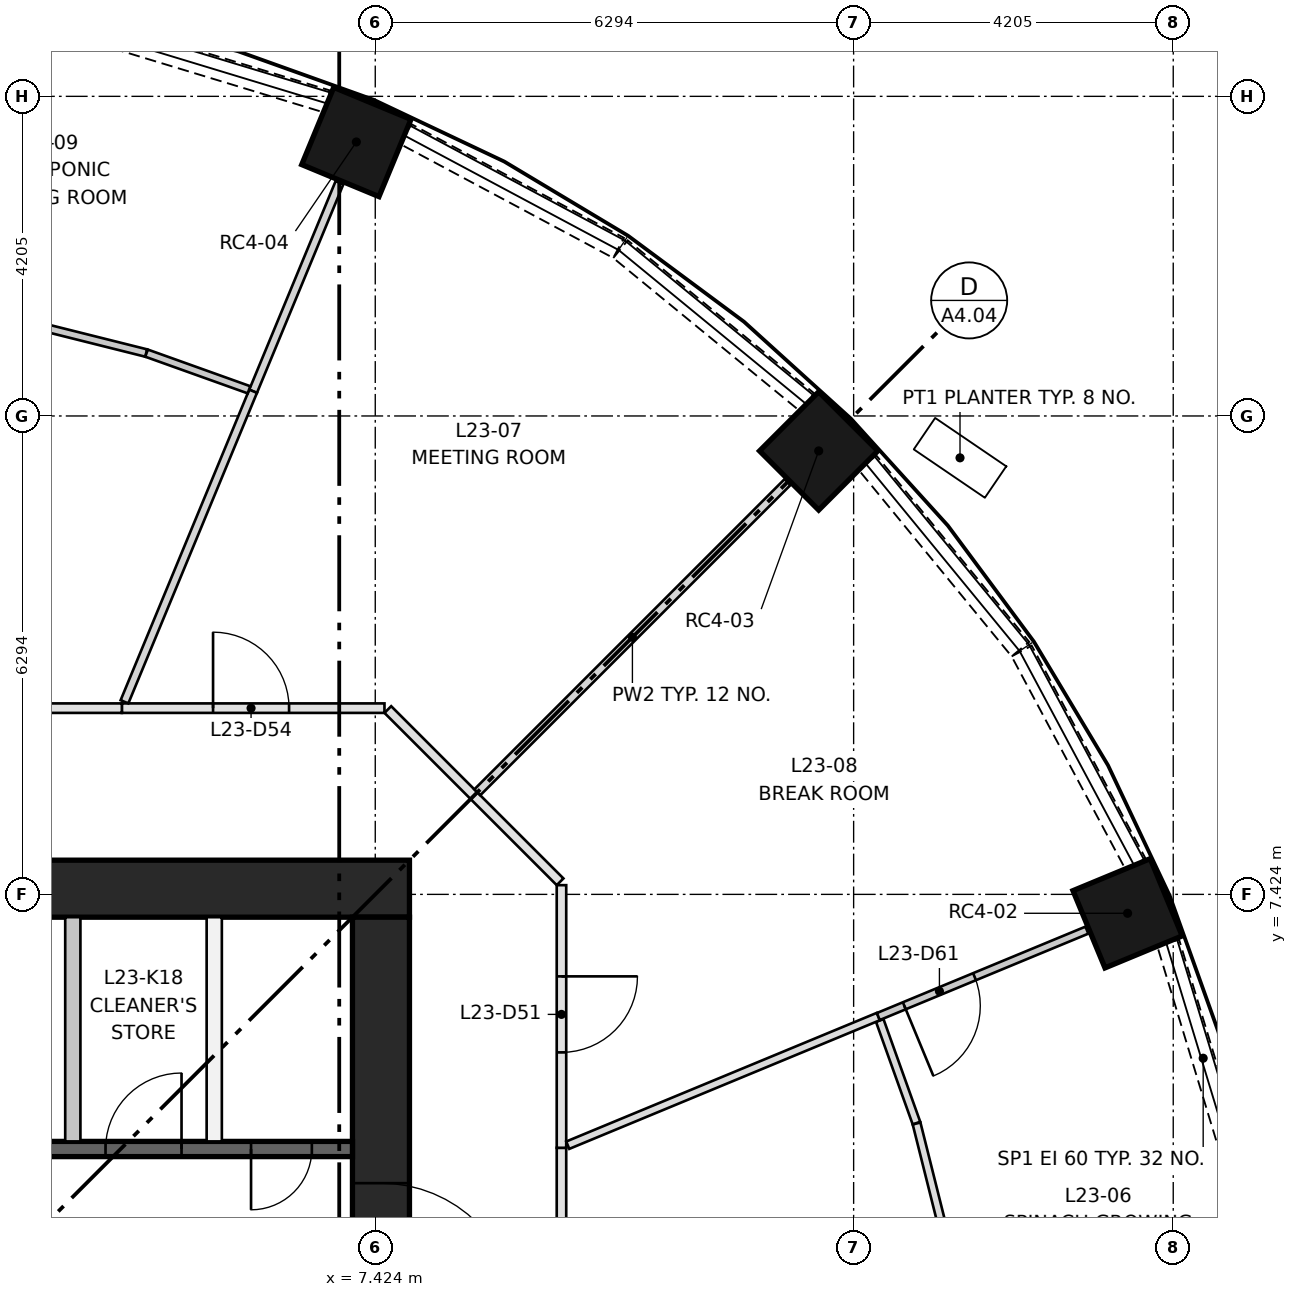
"""IFC4 building model, lengths in metres.
Left out: names, types, materials, properties, quantities, classifications, styles, units other than length and angle.
Written with IfcOpenShell. Run it as: python <this file> out.ifc"""

import sys

from ifc_helpers import new_model, si_unit, direction, frame, frame_2d, origin, origin_2d, place, context, subcontext, project, spatial, rectangle, extrude, element, fill, save


model = new_model("IFC4")
c1 = context("Model", 3, precision=1e-05, world=origin(), true_north=direction((0.0, 1.0)))
c2 = subcontext(c1, "Body", "Model", "MODEL_VIEW")
j1 = project(units=[si_unit("LENGTHUNIT", "METRE"), si_unit("PLANEANGLEUNIT", "RADIAN")], contexts=[c1])
p1 = place(None, origin())
s1 = spatial("IfcSite", under=j1, at=p1, CompositionType="ELEMENT")
p2 = place(p1, origin())
s2 = spatial("IfcBuilding", under=s1, at=p2, CompositionType="ELEMENT")
p3 = place(p2, frame((0.0, 0.0, 91.0)))
s3 = spatial("IfcBuildingStorey", under=s2, at=p3, CompositionType="ELEMENT", Elevation=91.0)
for number, where, z_axis, x_axis in (
    (1, (17.323, 7.175, 0.0), (0.0, 0.0, 1.0), (0.924, 0.383, 0.0)),
    (2, (13.258, 13.258, 0.0), (0.0, 0.0, 1.0), (0.707, 0.707, 0.0)),
    (3, (7.175, 17.323, 0.0), (0.0, 0.0, 1.0), (0.383, 0.924, 0.0)),
):
    element("IfcColumn", number, at=place(p3, frame(where, z_axis=z_axis, x_axis=x_axis)), inside=s3, PredefinedType="COLUMN", context=c2, shape_type="SweptSolid", body=[
        extrude(rectangle(XDim=1.1, YDim=1.1, at=origin_2d()), origin(), (0.0, 0.0, 1.0), 3.65),
    ])
p4 = place(p3, frame((-7.874, 7.499, 0.0), z_axis=(0.0, 0.0, 1.0), x_axis=(1.0, 0.0, 0.0)))
e4 = element("IfcWall", 4, at=p4, inside=s3, PredefinedType="SHEAR", context=c2, shape_type="SweptSolid", body=[
    extrude(rectangle(XDim=15.748, YDim=0.75, at=frame_2d((7.874, 0.0))), origin(), (0.0, 0.0, 1.0), 3.65),
])
p5 = place(p3, frame((7.499, -7.124, 0.0), z_axis=(0.0, 0.0, 1.0), x_axis=(0.0, 1.0, 0.0)))
e5 = element("IfcWall", 5, at=p5, inside=s3, PredefinedType="SHEAR", context=c2, shape_type="SweptSolid", body=[
    extrude(rectangle(XDim=14.248, YDim=0.75, at=frame_2d((7.124, 0.0))), origin(), (0.0, 0.0, 1.0), 3.65),
])
p6 = place(p5, frame((6.624, 0.0, 0.0)))
e6 = element("IfcOpeningElement", 6, at=p6, cuts=e5, PredefinedType="OPENING", context=c2, shape_type="SweptSolid", body=[
    extrude(rectangle(XDim=1.0, YDim=2.1, at=frame_2d((0.5, 1.05))), frame((0.0, 0.385, 0.0), z_axis=(0.0, -1.0, 0.0), x_axis=(1.0, 0.0, 0.0)), (0.0, 0.0, 1.0), 0.77),
])
p7 = place(p5, frame((3.5, 0.0, 0.0)))
e7 = element("IfcOpeningElement", 7, at=p7, cuts=e5, PredefinedType="OPENING", context=c2, shape_type="SweptSolid", body=[
    extrude(rectangle(XDim=1.8, YDim=2.1, at=frame_2d((0.9, 1.05))), frame((0.0, 0.385, 0.0), z_axis=(0.0, -1.0, 0.0), x_axis=(1.0, 0.0, 0.0)), (0.0, 0.0, 1.0), 0.77),
])
p8 = place(p5, frame((8.948, 0.0, 0.0)))
e8 = element("IfcOpeningElement", 8, at=p8, cuts=e5, PredefinedType="OPENING", context=c2, shape_type="SweptSolid", body=[
    extrude(rectangle(XDim=1.8, YDim=2.1, at=frame_2d((0.9, 1.05))), frame((0.0, 0.385, 0.0), z_axis=(0.0, -1.0, 0.0), x_axis=(1.0, 0.0, 0.0)), (0.0, 0.0, 1.0), 0.77),
])
p9 = place(p3, frame((0.0, 4.074, 0.0), z_axis=(0.0, 0.0, 1.0), x_axis=(1.0, 0.0, 0.0)))
e9 = element("IfcWall", 9, at=p9, inside=s3, PredefinedType="SHEAR", context=c2, shape_type="SweptSolid", body=[
    extrude(rectangle(XDim=7.124, YDim=0.2, at=frame_2d((3.562, 0.0))), origin(), (0.0, 0.0, 1.0), 3.3),
])
p10 = place(p9, frame((0.43, 0.0, 0.0)))
e10 = element("IfcOpeningElement", 10, at=p10, cuts=e9, PredefinedType="OPENING", context=c2, shape_type="SweptSolid", body=[
    extrude(rectangle(XDim=1.0, YDim=2.1, at=frame_2d((0.5, 1.05))), frame((0.0, 0.11, 0.0), z_axis=(0.0, -1.0, 0.0), x_axis=(1.0, 0.0, 0.0)), (0.0, 0.0, 1.0), 0.22),
])
p11 = place(p9, frame((2.153, 0.0, 0.0)))
e11 = element("IfcOpeningElement", 11, at=p11, cuts=e9, PredefinedType="OPENING", context=c2, shape_type="SweptSolid", body=[
    extrude(rectangle(XDim=1.0, YDim=2.1, at=frame_2d((0.5, 1.05))), frame((0.0, 0.11, 0.0), z_axis=(0.0, -1.0, 0.0), x_axis=(1.0, 0.0, 0.0)), (0.0, 0.0, 1.0), 0.22),
])
p12 = place(p9, frame((3.875, 0.0, 0.0)))
e12 = element("IfcOpeningElement", 12, at=p12, cuts=e9, PredefinedType="OPENING", context=c2, shape_type="SweptSolid", body=[
    extrude(rectangle(XDim=1.0, YDim=2.1, at=frame_2d((0.5, 1.05))), frame((0.0, 0.11, 0.0), z_axis=(0.0, -1.0, 0.0), x_axis=(1.0, 0.0, 0.0)), (0.0, 0.0, 1.0), 0.22),
])
p13 = place(p9, frame((5.79, 0.0, 0.0)))
e13 = element("IfcOpeningElement", 13, at=p13, cuts=e9, PredefinedType="OPENING", context=c2, shape_type="SweptSolid", body=[
    extrude(rectangle(XDim=0.8, YDim=2.1, at=frame_2d((0.4, 1.05))), frame((0.0, 0.11, 0.0), z_axis=(0.0, -1.0, 0.0), x_axis=(1.0, 0.0, 0.0)), (0.0, 0.0, 1.0), 0.22),
])
for number, where, z_axis, x_axis in (
    (14, (3.445, 4.174, 0.0), (0.0, 0.0, 1.0), (0.0, 1.0, 0.0)),
    (15, (5.305, 4.174, 0.0), (0.0, 0.0, 1.0), (0.0, 1.0, 0.0)),
):
    element("IfcWall", number, at=place(p3, frame(where, z_axis=z_axis, x_axis=x_axis)), inside=s3, PredefinedType="PARTITIONING", context=c2, shape_type="SweptSolid", body=[
        extrude(rectangle(XDim=2.95, YDim=0.2, at=frame_2d((1.475, 0.0))), origin(), (0.0, 0.0, 1.0), 3.3),
    ])
p14 = place(p3, frame((18.778, 3.75, 0.0), z_axis=(0.0, 0.0, 1.0), x_axis=(-0.290325591482, 0.956927923582, 0.0)))
e16 = element("IfcWall", 16, at=p14, inside=s3, PredefinedType="SOLIDWALL", context=c2, shape_type="SweptSolid", body=[
    extrude(rectangle(XDim=3.173, YDim=0.3, at=frame_2d((1.586, 0.0))), origin(), (0.0, 0.0, 1.0), 0.9),
])
p15 = place(p3, frame((17.425, 7.828, 0.0), z_axis=(0.0, 0.0, 1.0), x_axis=(-0.471458802606, 0.88188808669, 0.0)))
e17 = element("IfcWall", 17, at=p15, inside=s3, PredefinedType="SOLIDWALL", context=c2, shape_type="SweptSolid", body=[
    extrude(rectangle(XDim=3.172, YDim=0.3, at=frame_2d((1.586, 0.0))), origin(), (0.0, 0.0, 1.0), 0.9),
])
for number, where, z_axis, x_axis in (
    (18, (15.913, 10.651, 0.0), (0.0, 0.0, 1.0), (-0.634, 0.773, 0.0)),
    (19, (13.104, 13.9, 0.0), (0.0, 0.0, 1.0), (-0.773, 0.634, 0.0)),
):
    element("IfcWall", number, at=place(p3, frame(where, z_axis=z_axis, x_axis=x_axis)), inside=s3, PredefinedType="SOLIDWALL", context=c2, shape_type="SweptSolid", body=[
        extrude(rectangle(XDim=3.173, YDim=0.3, at=frame_2d((1.586, 0.0))), origin(), (0.0, 0.0, 1.0), 0.9),
    ])
p16 = place(p3, frame((10.626, 15.929, 0.0), z_axis=(0.0, 0.0, 1.0), x_axis=(-0.88188808669, 0.471458802606, 0.0)))
e20 = element("IfcWall", 20, at=p16, inside=s3, PredefinedType="SOLIDWALL", context=c2, shape_type="SweptSolid", body=[
    extrude(rectangle(XDim=3.172, YDim=0.3, at=frame_2d((1.586, 0.0))), origin(), (0.0, 0.0, 1.0), 0.9),
])
p17 = place(p3, frame((6.787, 17.856, 0.0), z_axis=(0.0, 0.0, 1.0), x_axis=(-0.956927923582, 0.290325591482, 0.0)))
e21 = element("IfcWall", 21, at=p17, inside=s3, PredefinedType="SOLIDWALL", context=c2, shape_type="SweptSolid", body=[
    extrude(rectangle(XDim=3.173, YDim=0.3, at=frame_2d((1.586, 0.0))), origin(), (0.0, 0.0, 1.0), 0.9),
])
p18 = place(p3, frame((9.874, 4.09, 0.0), z_axis=(0.0, 0.0, 1.0), x_axis=(0.0, -1.0, 0.0)))
e22 = element("IfcWall", 22, at=p18, inside=s3, PredefinedType="PARTITIONING", context=c2, shape_type="SweptSolid", body=[
    extrude(rectangle(XDim=4.09, YDim=0.125, at=frame_2d((2.045, 0.0))), origin(), (0.0, 0.0, 1.0), 3.3),
])
p19 = place(p18, frame((1.5, 0.0, 0.0)))
e23 = element("IfcOpeningElement", 23, at=p19, cuts=e22, PredefinedType="OPENING", context=c2, shape_type="SweptSolid", body=[
    extrude(rectangle(XDim=1.0, YDim=2.1, at=frame_2d((0.5, 1.05))), frame((0.0, 0.073, 0.0), z_axis=(0.0, -1.0, 0.0), x_axis=(1.0, 0.0, 0.0)), (0.0, 0.0, 1.0), 0.145),
])
p20 = place(p3, frame((8.722, 8.722, 0.0), z_axis=(0.0, 0.0, 1.0), x_axis=(0.70718294931, -0.707030604857, 0.0)))
e24 = element("IfcWall", 24, at=p20, inside=s3, PredefinedType="PARTITIONING", context=c2, shape_type="SweptSolid", body=[
    extrude(rectangle(XDim=1.603, YDim=0.125, at=frame_2d((0.801, 0.0))), origin(), (0.0, 0.0, 1.0), 3.3),
])
p21 = place(p3, frame((9.874, 7.545, 0.0), z_axis=(0.0, 0.0, 1.0), x_axis=(0.0, -1.0, 0.0)))
e25 = element("IfcWall", 25, at=p21, inside=s3, PredefinedType="PARTITIONING", context=c2, shape_type="SweptSolid", body=[
    extrude(rectangle(XDim=3.455, YDim=0.125, at=frame_2d((1.728, 0.0))), origin(), (0.0, 0.0, 1.0), 3.3),
])
p22 = place(p21, frame((1.2, 0.0, 0.0)))
e26 = element("IfcOpeningElement", 26, at=p22, cuts=e25, PredefinedType="OPENING", context=c2, shape_type="SweptSolid", body=[
    extrude(rectangle(XDim=1.0, YDim=2.1, at=frame_2d((0.5, 1.05))), frame((0.0, 0.073, 0.0), z_axis=(0.0, -1.0, 0.0), x_axis=(1.0, 0.0, 0.0)), (0.0, 0.0, 1.0), 0.145),
])
p23 = place(p3, frame((4.09, 9.874, 0.0), z_axis=(0.0, 0.0, 1.0), x_axis=(1.0, 0.0, 0.0)))
e27 = element("IfcWall", 27, at=p23, inside=s3, PredefinedType="PARTITIONING", context=c2, shape_type="SweptSolid", body=[
    extrude(rectangle(XDim=3.455, YDim=0.125, at=frame_2d((1.728, 0.0))), origin(), (0.0, 0.0, 1.0), 3.3),
])
p24 = place(p23, frame((1.2, 0.0, 0.0)))
e28 = element("IfcOpeningElement", 28, at=p24, cuts=e27, PredefinedType="OPENING", context=c2, shape_type="SweptSolid", body=[
    extrude(rectangle(XDim=1.0, YDim=2.1, at=frame_2d((0.5, 1.05))), frame((0.0, 0.073, 0.0), z_axis=(0.0, -1.0, 0.0), x_axis=(1.0, 0.0, 0.0)), (0.0, 0.0, 1.0), 0.145),
])
p25 = place(p3, frame((7.589, 9.856, 0.0), z_axis=(0.0, 0.0, 1.0), x_axis=(0.707030604857, -0.70718294931, 0.0)))
e29 = element("IfcWall", 29, at=p25, inside=s3, PredefinedType="PARTITIONING", context=c2, shape_type="SweptSolid", body=[
    extrude(rectangle(XDim=1.603, YDim=0.125, at=frame_2d((0.801, 0.0))), origin(), (0.0, 0.0, 1.0), 3.3),
])
p26 = place(p3, frame((-4.09, 9.874, 0.0), z_axis=(0.0, 0.0, 1.0), x_axis=(1.0, 0.0, 0.0)))
e30 = element("IfcWall", 30, at=p26, inside=s3, PredefinedType="PARTITIONING", context=c2, shape_type="SweptSolid", body=[
    extrude(rectangle(XDim=8.18, YDim=0.125, at=frame_2d((4.09, 0.0))), origin(), (0.0, 0.0, 1.0), 3.3),
])
p27 = place(p26, frame((3.6, 0.0, 0.0)))
e31 = element("IfcOpeningElement", 31, at=p27, cuts=e30, PredefinedType="OPENING", context=c2, shape_type="SweptSolid", body=[
    extrude(rectangle(XDim=1.0, YDim=2.1, at=frame_2d((0.5, 1.05))), frame((0.0, 0.073, 0.0), z_axis=(0.0, -1.0, 0.0), x_axis=(1.0, 0.0, 0.0)), (0.0, 0.0, 1.0), 0.145),
])
p28 = place(p3, frame((14.062, 5.765, 0.0), z_axis=(0.0, 0.0, 1.0), x_axis=(0.336940319535, -0.941526006583, 0.0)))
e32 = element("IfcWall", 32, at=p28, inside=s3, PredefinedType="PARTITIONING", context=c2, shape_type="SweptSolid", body=[
    extrude(rectangle(XDim=1.434, YDim=0.105, at=frame_2d((0.717, 0.0))), origin(), (0.0, 0.0, 1.0), 3.3),
])
p29 = place(p3, frame((14.546, 4.41, 0.0), z_axis=(0.0, 0.0, 1.0), x_axis=(0.242922070527, -0.970045806986, 0.0)))
e33 = element("IfcWall", 33, at=p29, inside=s3, PredefinedType="PARTITIONING", context=c2, shape_type="SweptSolid", body=[
    extrude(rectangle(XDim=1.486, YDim=0.105, at=frame_2d((0.743, 0.0))), origin(), (0.0, 0.0, 1.0), 3.3),
])
p30 = place(p3, frame((9.957, 4.124, 0.0), z_axis=(0.0, 0.0, 1.0), x_axis=(0.923862097388, 0.382725521764, 0.0)))
e34 = element("IfcWall", 34, at=p30, inside=s3, PredefinedType="PARTITIONING", context=c2, shape_type="SweptSolid", body=[
    extrude(rectangle(XDim=4.423, YDim=0.105, at=frame_2d((2.211, 0.0))), origin(), (0.0, 0.0, 1.0), 3.3),
])
p31 = place(p3, frame((16.787, 6.953, 0.0), z_axis=(0.0, 0.0, 1.0), x_axis=(-0.923889594764, -0.382659139036, 0.0)))
e35 = element("IfcWall", 35, at=p31, inside=s3, PredefinedType="PARTITIONING", context=c2, shape_type="SweptSolid", body=[
    extrude(rectangle(XDim=2.97, YDim=0.1, at=frame_2d((1.485, 0.0))), origin(), (0.0, 0.0, 1.0), 3.3),
])
p32 = place(p31, frame((1.6, 0.0, 0.0)))
e36 = element("IfcOpeningElement", 36, at=p32, cuts=e35, PredefinedType="OPENING", context=c2, shape_type="SweptSolid", body=[
    extrude(rectangle(XDim=1.0, YDim=2.1, at=frame_2d((0.5, 1.05))), frame((0.0, 0.06, 0.0), z_axis=(0.0, -1.0, 0.0), x_axis=(1.0, 0.0, 0.0)), (0.0, 0.0, 1.0), 0.12),
])
p33 = place(p3, frame((12.848, 12.848, 0.0), z_axis=(0.0, 0.0, 1.0), x_axis=(-0.707106781187, -0.707106781187, 0.0)))
e37 = element("IfcWall", 37, at=p33, inside=s3, PredefinedType="PARTITIONING", context=c2, shape_type="SweptSolid", body=[
    extrude(rectangle(XDim=5.772, YDim=0.11, at=frame_2d((2.886, 0.0))), origin(), (0.0, 0.0, 1.0), 3.3),
])
p34 = place(p3, frame((5.817, 14.043, 0.0), z_axis=(0.0, 0.0, 1.0), x_axis=(0.382659139036, 0.923889594764, 0.0)))
e38 = element("IfcWall", 38, at=p34, inside=s3, PredefinedType="PARTITIONING", context=c2, shape_type="SweptSolid", body=[
    extrude(rectangle(XDim=2.97, YDim=0.11, at=frame_2d((1.485, 0.0))), origin(), (0.0, 0.0, 1.0), 3.3),
])
p35 = place(p3, frame((4.125, 9.958, 0.0), z_axis=(0.0, 0.0, 1.0), x_axis=(0.382709362011, 0.923868791674, 0.0)))
e39 = element("IfcWall", 39, at=p35, inside=s3, PredefinedType="PARTITIONING", context=c2, shape_type="SweptSolid", body=[
    extrude(rectangle(XDim=4.422, YDim=0.11, at=frame_2d((2.211, 0.0))), origin(), (0.0, 0.0, 1.0), 3.3),
])
p36 = place(p3, frame((4.41, 14.546, 0.0), z_axis=(0.0, 0.0, 1.0), x_axis=(-0.970055497102, 0.242883372306, 0.0)))
e40 = element("IfcWall", 40, at=p36, inside=s3, PredefinedType="PARTITIONING", context=c2, shape_type="SweptSolid", body=[
    extrude(rectangle(XDim=1.487, YDim=0.1, at=frame_2d((0.743, 0.0))), origin(), (0.0, 0.0, 1.0), 3.3),
])
p37 = place(p3, frame((5.763, 14.062, 0.0), z_axis=(0.0, 0.0, 1.0), x_axis=(-0.941587499657, 0.33676843749, 0.0)))
e41 = element("IfcWall", 41, at=p37, inside=s3, PredefinedType="PARTITIONING", context=c2, shape_type="SweptSolid", body=[
    extrude(rectangle(XDim=1.432, YDim=0.1, at=frame_2d((0.716, 0.0))), origin(), (0.0, 0.0, 1.0), 3.3),
])
p38 = place(p12, origin())
e42 = element("IfcDoor", 42, at=p38, inside=s3, OperationType="SINGLE_SWING_RIGHT", PredefinedType="DOOR", context=c2, shape_type="SweptSolid", body=[
    extrude(rectangle(XDim=1.0, YDim=2.1, at=frame_2d((0.5, 1.05))), frame((0.0, 0.025, 0.0), z_axis=(0.0, -1.0, 0.0), x_axis=(1.0, 0.0, 0.0)), (0.0, 0.0, 1.0), 0.05),
])
fill(e12, e42)
p39 = place(p13, frame((0.8, 0.0, 0.0), z_axis=(0.0, 0.0, 1.0), x_axis=(-1.0, 0.0, 0.0)))
e43 = element("IfcDoor", 43, at=p39, inside=s3, OperationType="SINGLE_SWING_LEFT", PredefinedType="DOOR", context=c2, shape_type="SweptSolid", body=[
    extrude(rectangle(XDim=0.8, YDim=2.1, at=frame_2d((0.4, 1.05))), frame((0.0, 0.025, 0.0), z_axis=(0.0, -1.0, 0.0), x_axis=(1.0, 0.0, 0.0)), (0.0, 0.0, 1.0), 0.05),
])
fill(e13, e43)
p40 = place(p8, frame((1.8, 0.0, 0.0), z_axis=(0.0, 0.0, 1.0), x_axis=(-1.0, 0.0, 0.0)))
e44 = element("IfcDoor", 44, at=p40, inside=s3, OperationType="DOUBLE_DOOR_SINGLE_SWING", PredefinedType="DOOR", context=c2, shape_type="SweptSolid", body=[
    extrude(rectangle(XDim=1.8, YDim=2.1, at=frame_2d((0.9, 1.05))), frame((0.0, 0.025, 0.0), z_axis=(0.0, -1.0, 0.0), x_axis=(1.0, 0.0, 0.0)), (0.0, 0.0, 1.0), 0.05),
])
fill(e8, e44)
p41 = place(p22, origin())
e45 = element("IfcDoor", 45, at=p41, inside=s3, OperationType="SINGLE_SWING_LEFT", PredefinedType="DOOR", context=c2, shape_type="SweptSolid", body=[
    extrude(rectangle(XDim=1.0, YDim=2.1, at=frame_2d((0.5, 1.05))), frame((0.0, 0.025, 0.0), z_axis=(0.0, -1.0, 0.0), x_axis=(1.0, 0.0, 0.0)), (0.0, 0.0, 1.0), 0.05),
])
fill(e26, e45)
p42 = place(p24, origin())
e46 = element("IfcDoor", 46, at=p42, inside=s3, OperationType="SINGLE_SWING_LEFT", PredefinedType="DOOR", context=c2, shape_type="SweptSolid", body=[
    extrude(rectangle(XDim=1.0, YDim=2.1, at=frame_2d((0.5, 1.05))), frame((0.0, 0.025, 0.0), z_axis=(0.0, -1.0, 0.0), x_axis=(1.0, 0.0, 0.0)), (0.0, 0.0, 1.0), 0.05),
])
fill(e28, e46)
p43 = place(p32, origin())
e47 = element("IfcDoor", 47, at=p43, inside=s3, OperationType="SINGLE_SWING_RIGHT", PredefinedType="DOOR", context=c2, shape_type="SweptSolid", body=[
    extrude(rectangle(XDim=1.0, YDim=2.1, at=frame_2d((0.5, 1.05))), frame((0.0, 0.025, 0.0), z_axis=(0.0, -1.0, 0.0), x_axis=(1.0, 0.0, 0.0)), (0.0, 0.0, 1.0), 0.05),
])
fill(e36, e47)
save(model, sys.argv[1])
